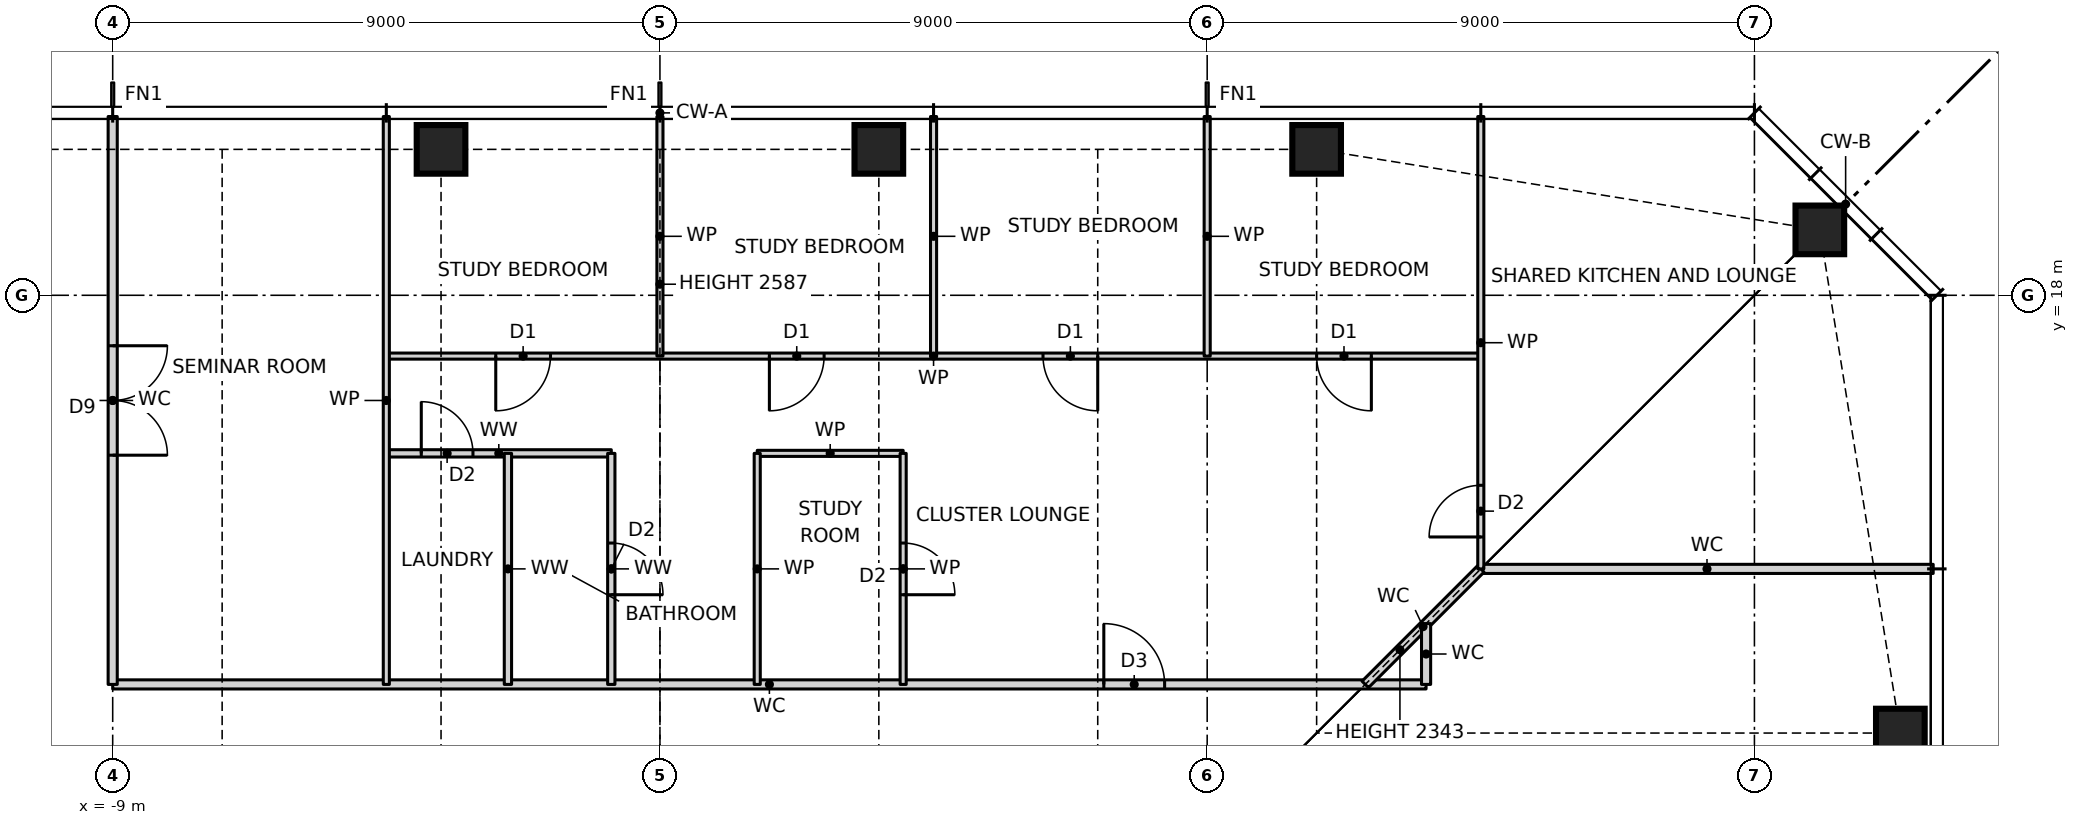
"""IFC4 building model, lengths in metres.
Left out: names, types, materials, properties, quantities, classifications, styles, units other than length and angle.
Written with IfcOpenShell. Run it as: python <this file> out.ifc"""

import sys

from ifc_helpers import new_model, si_unit, direction, frame, frame_2d, origin, origin_2d, place, context, subcontext, project, spatial, rectangle, hollow_rectangle, extrude, element, fill, save


model = new_model("IFC4")
c1 = context("Model", 3, precision=1e-05, world=origin(), true_north=direction((0.0, 1.0)))
c2 = subcontext(c1, "Body", "Model", "MODEL_VIEW")
j1 = project(units=[si_unit("LENGTHUNIT", "METRE"), si_unit("PLANEANGLEUNIT", "RADIAN")], contexts=[c1])
p1 = place(None, origin())
s1 = spatial("IfcSite", under=j1, at=p1, CompositionType="ELEMENT")
p2 = place(p1, origin())
s2 = spatial("IfcBuilding", under=s1, at=p2, CompositionType="ELEMENT")
p3 = place(p2, frame((0.0, 0.0, 101.5)))
s3 = spatial("IfcBuildingStorey", under=s2, at=p3, CompositionType="ELEMENT", Elevation=101.5)
for number, where, z_axis, x_axis in (
    (1, (20.4, 10.8, 0.0), (0.0, 0.0, 1.0), (1.0, 0.0, 0.0)),
    (2, (19.076, 19.076, 0.0), (0.0, 0.0, 1.0), (1.0, 0.0, 0.0)),
    (3, (10.8, 20.4, 0.0), (0.0, 0.0, 1.0), (1.0, 0.0, 0.0)),
    (4, (3.6, 20.4, 0.0), (0.0, 0.0, 1.0), (1.0, 0.0, 0.0)),
    (5, (-3.6, 20.4, 0.0), (0.0, 0.0, 1.0), (1.0, 0.0, 0.0)),
):
    element("IfcColumn", number, at=place(p3, frame(where, z_axis=z_axis, x_axis=x_axis)), inside=s3, PredefinedType="COLUMN", context=c2, shape_type="SweptSolid", body=[
        extrude(hollow_rectangle(XDim=0.8, YDim=0.8, WallThickness=0.07, at=origin_2d()), origin(), (0.0, 0.0, 1.0), 3.5),
    ])
p4 = place(p3, frame((-9.0, 11.6, 0.0), z_axis=(0.0, 0.0, 1.0), x_axis=(1.0, 0.0, 0.0)))
e6 = element("IfcWall", 6, at=p4, inside=s3, PredefinedType="PARTITIONING", context=c2, shape_type="SweptSolid", body=[
    extrude(rectangle(XDim=21.6, YDim=0.15, at=frame_2d((10.8, 0.0))), origin(), (0.0, 0.0, 1.0), 3.27),
])
p5 = place(p4, frame((16.3, 0.0, 0.0)))
e7 = element("IfcOpeningElement", 7, at=p5, cuts=e6, PredefinedType="OPENING", context=c2, shape_type="SweptSolid", body=[
    extrude(rectangle(XDim=1.0, YDim=2.1, at=frame_2d((0.5, 1.05))), frame((0.0, 0.085, 0.0), z_axis=(0.0, -1.0, 0.0), x_axis=(1.0, 0.0, 0.0)), (0.0, 0.0, 1.0), 0.17),
])
p6 = place(p3, frame((13.5, 13.5, 0.0), z_axis=(0.0, 0.0, 1.0), x_axis=(1.0, 0.0, 0.0)))
e8 = element("IfcWall", 8, at=p6, inside=s3, PredefinedType="PARTITIONING", context=c2, shape_type="SweptSolid", body=[
    extrude(rectangle(XDim=7.44, YDim=0.15, at=frame_2d((3.72, 0.0))), origin(), (0.0, 0.0, 1.0), 3.27),
])
p7 = place(p3, frame((-4.5, 15.4, 0.0), z_axis=(0.0, 0.0, 1.0), x_axis=(1.0, 0.0, 0.0)))
e9 = element("IfcWall", 9, at=p7, inside=s3, PredefinedType="PARTITIONING", context=c2, shape_type="SweptSolid", body=[
    extrude(rectangle(XDim=3.7, YDim=0.12, at=frame_2d((1.85, 0.0))), origin(), (0.0, 0.0, 1.0), 3.27),
])
p8 = place(p7, frame((0.575, 0.0, 0.0)))
e10 = element("IfcOpeningElement", 10, at=p8, cuts=e9, PredefinedType="OPENING", context=c2, shape_type="SweptSolid", body=[
    extrude(rectangle(XDim=0.85, YDim=2.1, at=frame_2d((0.425, 1.05))), frame((0.0, 0.07, 0.0), z_axis=(0.0, -1.0, 0.0), x_axis=(1.0, 0.0, 0.0)), (0.0, 0.0, 1.0), 0.14),
])
p9 = place(p3, frame((1.6, 15.4, 0.0), z_axis=(0.0, 0.0, 1.0), x_axis=(1.0, 0.0, 0.0)))
e11 = element("IfcWall", 11, at=p9, inside=s3, PredefinedType="PARTITIONING", context=c2, shape_type="SweptSolid", body=[
    extrude(rectangle(XDim=2.4, YDim=0.1, at=frame_2d((1.2, 0.0))), origin(), (0.0, 0.0, 1.0), 3.27),
])
p10 = place(p3, frame((-4.5, 17.0, 0.0), z_axis=(0.0, 0.0, 1.0), x_axis=(1.0, 0.0, 0.0)))
e12 = element("IfcWall", 12, at=p10, inside=s3, PredefinedType="PARTITIONING", context=c2, shape_type="SweptSolid", body=[
    extrude(rectangle(XDim=18.0, YDim=0.1, at=frame_2d((9.0, 0.0))), origin(), (0.0, 0.0, 1.0), 3.27),
])
p11 = place(p10, frame((15.3, 0.0, 0.0)))
e13 = element("IfcOpeningElement", 13, at=p11, cuts=e12, PredefinedType="OPENING", context=c2, shape_type="SweptSolid", body=[
    extrude(rectangle(XDim=0.9, YDim=2.1, at=frame_2d((0.45, 1.05))), frame((0.0, 0.06, 0.0), z_axis=(0.0, -1.0, 0.0), x_axis=(1.0, 0.0, 0.0)), (0.0, 0.0, 1.0), 0.12),
])
p12 = place(p10, frame((10.8, 0.0, 0.0)))
e14 = element("IfcOpeningElement", 14, at=p12, cuts=e12, PredefinedType="OPENING", context=c2, shape_type="SweptSolid", body=[
    extrude(rectangle(XDim=0.9, YDim=2.1, at=frame_2d((0.45, 1.05))), frame((0.0, 0.06, 0.0), z_axis=(0.0, -1.0, 0.0), x_axis=(1.0, 0.0, 0.0)), (0.0, 0.0, 1.0), 0.12),
])
p13 = place(p10, frame((6.3, 0.0, 0.0)))
e15 = element("IfcOpeningElement", 15, at=p13, cuts=e12, PredefinedType="OPENING", context=c2, shape_type="SweptSolid", body=[
    extrude(rectangle(XDim=0.9, YDim=2.1, at=frame_2d((0.45, 1.05))), frame((0.0, 0.06, 0.0), z_axis=(0.0, -1.0, 0.0), x_axis=(1.0, 0.0, 0.0)), (0.0, 0.0, 1.0), 0.12),
])
p14 = place(p10, frame((1.8, 0.0, 0.0)))
e16 = element("IfcOpeningElement", 16, at=p14, cuts=e12, PredefinedType="OPENING", context=c2, shape_type="SweptSolid", body=[
    extrude(rectangle(XDim=0.9, YDim=2.1, at=frame_2d((0.45, 1.05))), frame((0.0, 0.06, 0.0), z_axis=(0.0, -1.0, 0.0), x_axis=(1.0, 0.0, 0.0)), (0.0, 0.0, 1.0), 0.12),
])
p15 = place(p3, frame((11.6, 11.6, 0.0), z_axis=(0.0, 0.0, 1.0), x_axis=(0.707106781187, 0.707106781187, 0.0)))
e17 = element("IfcWall", 17, at=p15, inside=s3, PredefinedType="PARTITIONING", context=c2, shape_type="SweptSolid", body=[
    extrude(rectangle(XDim=2.687, YDim=0.15, at=frame_2d((1.343, 0.0))), origin(), (0.0, 0.0, 1.0), 2.343),
])
p16 = place(p3, frame((13.5, 13.5, 0.0), z_axis=(0.0, 0.0, 1.0), x_axis=(0.0, 1.0, 0.0)))
e18 = element("IfcWall", 18, at=p16, inside=s3, PredefinedType="PARTITIONING", context=c2, shape_type="SweptSolid", body=[
    extrude(rectangle(XDim=7.44, YDim=0.1, at=frame_2d((3.72, 0.0))), origin(), (0.0, 0.0, 1.0), 3.27),
])
p17 = place(p16, frame((0.525, 0.0, 0.0)))
e19 = element("IfcOpeningElement", 19, at=p17, cuts=e18, PredefinedType="OPENING", context=c2, shape_type="SweptSolid", body=[
    extrude(rectangle(XDim=0.85, YDim=2.1, at=frame_2d((0.425, 1.05))), frame((0.0, 0.06, 0.0), z_axis=(0.0, -1.0, 0.0), x_axis=(1.0, 0.0, 0.0)), (0.0, 0.0, 1.0), 0.12),
])
p18 = place(p3, frame((12.6, 11.6, 0.0), z_axis=(0.0, 0.0, 1.0), x_axis=(0.0, 1.0, 0.0)))
e20 = element("IfcWall", 20, at=p18, inside=s3, PredefinedType="PARTITIONING", context=c2, shape_type="SweptSolid", body=[
    extrude(rectangle(XDim=1.0, YDim=0.15, at=frame_2d((0.5, 0.0))), origin(), (0.0, 0.0, 1.0), 3.27),
])
for number, where, z_axis, x_axis in (
    (21, (9.0, 17.0, 0.0), (0.0, 0.0, 1.0), (0.0, 1.0, 0.0)),
    (22, (4.5, 17.0, 0.0), (0.0, 0.0, 1.0), (0.0, 1.0, 0.0)),
):
    element("IfcWall", number, at=place(p3, frame(where, z_axis=z_axis, x_axis=x_axis)), inside=s3, PredefinedType="PARTITIONING", context=c2, shape_type="SweptSolid", body=[
        extrude(rectangle(XDim=3.94, YDim=0.1, at=frame_2d((1.97, 0.0))), origin(), (0.0, 0.0, 1.0), 3.27),
    ])
p19 = place(p3, frame((4.0, 11.6, 0.0), z_axis=(0.0, 0.0, 1.0), x_axis=(0.0, 1.0, 0.0)))
e23 = element("IfcWall", 23, at=p19, inside=s3, PredefinedType="PARTITIONING", context=c2, shape_type="SweptSolid", body=[
    extrude(rectangle(XDim=3.8, YDim=0.1, at=frame_2d((1.9, 0.0))), origin(), (0.0, 0.0, 1.0), 3.27),
])
p20 = place(p19, frame((1.475, 0.0, 0.0)))
e24 = element("IfcOpeningElement", 24, at=p20, cuts=e23, PredefinedType="OPENING", context=c2, shape_type="SweptSolid", body=[
    extrude(rectangle(XDim=0.85, YDim=2.1, at=frame_2d((0.425, 1.05))), frame((0.0, 0.06, 0.0), z_axis=(0.0, -1.0, 0.0), x_axis=(1.0, 0.0, 0.0)), (0.0, 0.0, 1.0), 0.12),
])
p21 = place(p3, frame((1.6, 11.6, 0.0), z_axis=(0.0, 0.0, 1.0), x_axis=(0.0, 1.0, 0.0)))
e25 = element("IfcWall", 25, at=p21, inside=s3, PredefinedType="PARTITIONING", context=c2, shape_type="SweptSolid", body=[
    extrude(rectangle(XDim=3.8, YDim=0.1, at=frame_2d((1.9, 0.0))), origin(), (0.0, 0.0, 1.0), 3.27),
])
p22 = place(p3, frame((0.0, 17.0, 0.0), z_axis=(0.0, 0.0, 1.0), x_axis=(0.0, 1.0, 0.0)))
e26 = element("IfcWall", 26, at=p22, inside=s3, PredefinedType="PARTITIONING", context=c2, shape_type="SweptSolid", body=[
    extrude(rectangle(XDim=3.94, YDim=0.1, at=frame_2d((1.97, 0.0))), origin(), (0.0, 0.0, 1.0), 2.587),
])
p23 = place(p3, frame((-0.8, 11.6, 0.0), z_axis=(0.0, 0.0, 1.0), x_axis=(0.0, 1.0, 0.0)))
e27 = element("IfcWall", 27, at=p23, inside=s3, PredefinedType="PARTITIONING", context=c2, shape_type="SweptSolid", body=[
    extrude(rectangle(XDim=3.8, YDim=0.12, at=frame_2d((1.9, 0.0))), origin(), (0.0, 0.0, 1.0), 3.27),
])
p24 = place(p23, frame((1.475, 0.0, 0.0)))
e28 = element("IfcOpeningElement", 28, at=p24, cuts=e27, PredefinedType="OPENING", context=c2, shape_type="SweptSolid", body=[
    extrude(rectangle(XDim=0.85, YDim=2.1, at=frame_2d((0.425, 1.05))), frame((0.0, 0.07, 0.0), z_axis=(0.0, -1.0, 0.0), x_axis=(1.0, 0.0, 0.0)), (0.0, 0.0, 1.0), 0.14),
])
p25 = place(p3, frame((-2.5, 11.6, 0.0), z_axis=(0.0, 0.0, 1.0), x_axis=(0.0, 1.0, 0.0)))
e29 = element("IfcWall", 29, at=p25, inside=s3, PredefinedType="PARTITIONING", context=c2, shape_type="SweptSolid", body=[
    extrude(rectangle(XDim=3.8, YDim=0.12, at=frame_2d((1.9, 0.0))), origin(), (0.0, 0.0, 1.0), 3.27),
])
p26 = place(p3, frame((-4.5, 11.6, 0.0), z_axis=(0.0, 0.0, 1.0), x_axis=(0.0, 1.0, 0.0)))
e30 = element("IfcWall", 30, at=p26, inside=s3, PredefinedType="PARTITIONING", context=c2, shape_type="SweptSolid", body=[
    extrude(rectangle(XDim=9.34, YDim=0.1, at=frame_2d((4.67, 0.0))), origin(), (0.0, 0.0, 1.0), 3.27),
])
p27 = place(p3, frame((-9.0, 11.6, 0.0), z_axis=(0.0, 0.0, 1.0), x_axis=(0.0, 1.0, 0.0)))
e31 = element("IfcWall", 31, at=p27, inside=s3, PredefinedType="PARTITIONING", context=c2, shape_type="SweptSolid", body=[
    extrude(rectangle(XDim=9.34, YDim=0.15, at=frame_2d((4.67, 0.0))), origin(), (0.0, 0.0, 1.0), 3.27),
])
p28 = place(p27, frame((3.77, 0.0, 0.0)))
e32 = element("IfcOpeningElement", 32, at=p28, cuts=e31, PredefinedType="OPENING", context=c2, shape_type="SweptSolid", body=[
    extrude(rectangle(XDim=1.8, YDim=2.1, at=frame_2d((0.9, 1.05))), frame((0.0, 0.085, 0.0), z_axis=(0.0, -1.0, 0.0), x_axis=(1.0, 0.0, 0.0)), (0.0, 0.0, 1.0), 0.17),
])
p29 = place(p11, frame((0.9, 0.0, 0.0), z_axis=(0.0, 0.0, 1.0), x_axis=(-1.0, 0.0, 0.0)))
e33 = element("IfcDoor", 33, at=p29, inside=s3, OperationType="SINGLE_SWING_LEFT", PredefinedType="DOOR", context=c2, shape_type="SweptSolid", body=[
    extrude(rectangle(XDim=0.9, YDim=2.1, at=frame_2d((0.45, 1.05))), frame((0.0, 0.025, 0.0), z_axis=(0.0, -1.0, 0.0), x_axis=(1.0, 0.0, 0.0)), (0.0, 0.0, 1.0), 0.05),
])
fill(e13, e33)
p30 = place(p12, frame((0.9, 0.0, 0.0), z_axis=(0.0, 0.0, 1.0), x_axis=(-1.0, 0.0, 0.0)))
e34 = element("IfcDoor", 34, at=p30, inside=s3, OperationType="SINGLE_SWING_LEFT", PredefinedType="DOOR", context=c2, shape_type="SweptSolid", body=[
    extrude(rectangle(XDim=0.9, YDim=2.1, at=frame_2d((0.45, 1.05))), frame((0.0, 0.025, 0.0), z_axis=(0.0, -1.0, 0.0), x_axis=(1.0, 0.0, 0.0)), (0.0, 0.0, 1.0), 0.05),
])
fill(e14, e34)
p31 = place(p13, frame((0.9, 0.0, 0.0), z_axis=(0.0, 0.0, 1.0), x_axis=(-1.0, 0.0, 0.0)))
e35 = element("IfcDoor", 35, at=p31, inside=s3, OperationType="SINGLE_SWING_RIGHT", PredefinedType="DOOR", context=c2, shape_type="SweptSolid", body=[
    extrude(rectangle(XDim=0.9, YDim=2.1, at=frame_2d((0.45, 1.05))), frame((0.0, 0.025, 0.0), z_axis=(0.0, -1.0, 0.0), x_axis=(1.0, 0.0, 0.0)), (0.0, 0.0, 1.0), 0.05),
])
fill(e15, e35)
p32 = place(p14, frame((0.9, 0.0, 0.0), z_axis=(0.0, 0.0, 1.0), x_axis=(-1.0, 0.0, 0.0)))
e36 = element("IfcDoor", 36, at=p32, inside=s3, OperationType="SINGLE_SWING_RIGHT", PredefinedType="DOOR", context=c2, shape_type="SweptSolid", body=[
    extrude(rectangle(XDim=0.9, YDim=2.1, at=frame_2d((0.45, 1.05))), frame((0.0, 0.025, 0.0), z_axis=(0.0, -1.0, 0.0), x_axis=(1.0, 0.0, 0.0)), (0.0, 0.0, 1.0), 0.05),
])
fill(e16, e36)
p33 = place(p5, origin())
e37 = element("IfcDoor", 37, at=p33, inside=s3, OperationType="SINGLE_SWING_LEFT", PredefinedType="DOOR", context=c2, shape_type="SweptSolid", body=[
    extrude(rectangle(XDim=1.0, YDim=2.1, at=frame_2d((0.5, 1.05))), frame((0.0, 0.025, 0.0), z_axis=(0.0, -1.0, 0.0), x_axis=(1.0, 0.0, 0.0)), (0.0, 0.0, 1.0), 0.05),
])
fill(e7, e37)
p34 = place(p20, frame((0.85, 0.0, 0.0), z_axis=(0.0, 0.0, 1.0), x_axis=(-1.0, 0.0, 0.0)))
e38 = element("IfcDoor", 38, at=p34, inside=s3, OperationType="SINGLE_SWING_RIGHT", PredefinedType="DOOR", context=c2, shape_type="SweptSolid", body=[
    extrude(rectangle(XDim=0.85, YDim=2.1, at=frame_2d((0.425, 1.05))), frame((0.0, 0.025, 0.0), z_axis=(0.0, -1.0, 0.0), x_axis=(1.0, 0.0, 0.0)), (0.0, 0.0, 1.0), 0.05),
])
fill(e24, e38)
p35 = place(p24, frame((0.85, 0.0, 0.0), z_axis=(0.0, 0.0, 1.0), x_axis=(-1.0, 0.0, 0.0)))
e39 = element("IfcDoor", 39, at=p35, inside=s3, OperationType="SINGLE_SWING_RIGHT", PredefinedType="DOOR", context=c2, shape_type="SweptSolid", body=[
    extrude(rectangle(XDim=0.85, YDim=2.1, at=frame_2d((0.425, 1.05))), frame((0.0, 0.025, 0.0), z_axis=(0.0, -1.0, 0.0), x_axis=(1.0, 0.0, 0.0)), (0.0, 0.0, 1.0), 0.05),
])
fill(e28, e39)
p36 = place(p8, origin())
e40 = element("IfcDoor", 40, at=p36, inside=s3, OperationType="SINGLE_SWING_LEFT", PredefinedType="DOOR", context=c2, shape_type="SweptSolid", body=[
    extrude(rectangle(XDim=0.85, YDim=2.1, at=frame_2d((0.425, 1.05))), frame((0.0, 0.025, 0.0), z_axis=(0.0, -1.0, 0.0), x_axis=(1.0, 0.0, 0.0)), (0.0, 0.0, 1.0), 0.05),
])
fill(e10, e40)
p37 = place(p28, frame((1.8, 0.0, 0.0), z_axis=(0.0, 0.0, 1.0), x_axis=(-1.0, 0.0, 0.0)))
e41 = element("IfcDoor", 41, at=p37, inside=s3, OperationType="DOUBLE_DOOR_SINGLE_SWING", PredefinedType="DOOR", context=c2, shape_type="SweptSolid", body=[
    extrude(rectangle(XDim=1.8, YDim=2.1, at=frame_2d((0.9, 1.05))), frame((0.0, 0.025, 0.0), z_axis=(0.0, -1.0, 0.0), x_axis=(1.0, 0.0, 0.0)), (0.0, 0.0, 1.0), 0.05),
])
fill(e32, e41)
p38 = place(p17, origin())
e42 = element("IfcDoor", 42, at=p38, inside=s3, OperationType="SINGLE_SWING_LEFT", PredefinedType="DOOR", context=c2, shape_type="SweptSolid", body=[
    extrude(rectangle(XDim=0.85, YDim=2.1, at=frame_2d((0.425, 1.05))), frame((0.0, 0.025, 0.0), z_axis=(0.0, -1.0, 0.0), x_axis=(1.0, 0.0, 0.0)), (0.0, 0.0, 1.0), 0.05),
])
fill(e19, e42)
save(model, sys.argv[1])
